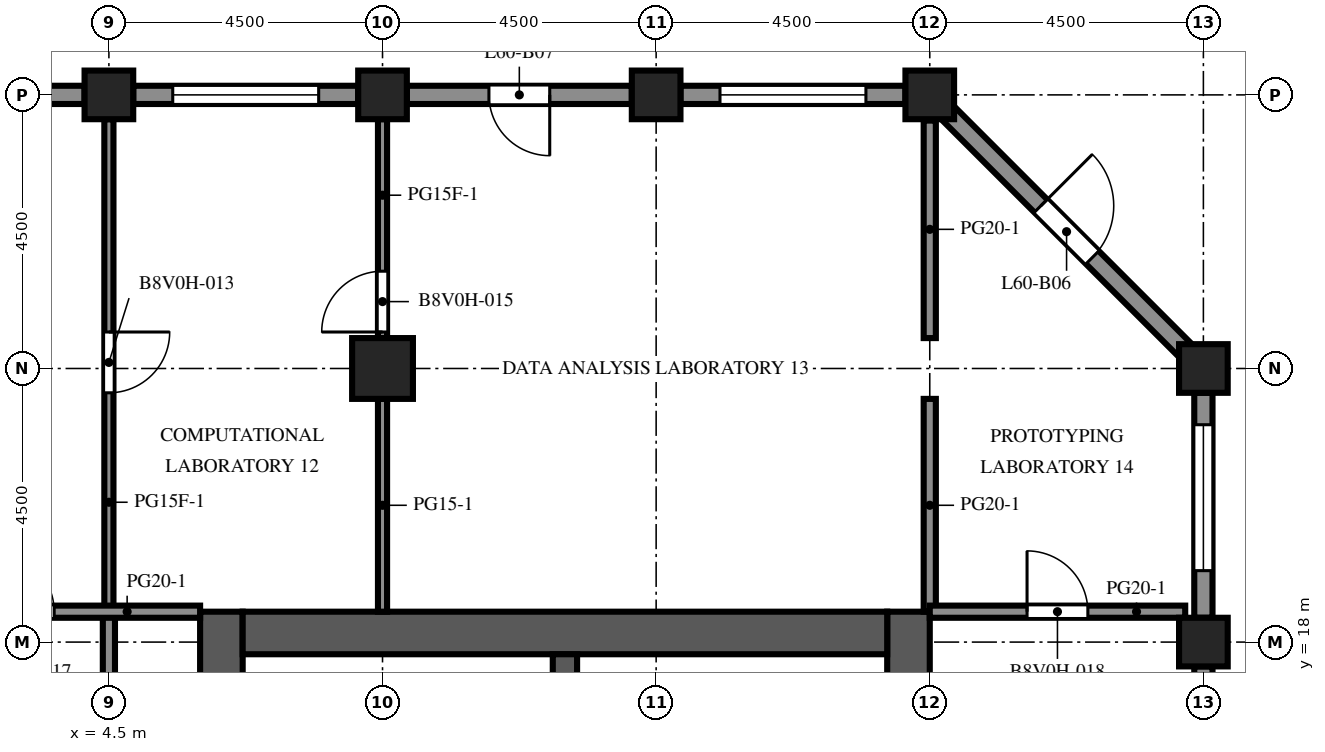
"""IFC4 building model, lengths in metres.
Left out: names, types, materials, properties, quantities, classifications, styles, units other than length and angle.
Written with IfcOpenShell. Run it as: python <this file> out.ifc"""

import sys

from ifc_helpers import new_model, si_unit, direction, frame, frame_2d, origin, origin_2d, place, context, subcontext, project, spatial, rectangle, extrude, element, fill, save


model = new_model("IFC4")
c1 = context("Model", 3, precision=1e-05, world=origin(), true_north=direction((0.0, 1.0)))
c2 = subcontext(c1, "Body", "Model", "MODEL_VIEW")
j1 = project(units=[si_unit("LENGTHUNIT", "METRE"), si_unit("PLANEANGLEUNIT", "RADIAN")], contexts=[c1])
p1 = place(None, origin())
s1 = spatial("IfcSite", under=j1, at=p1, CompositionType="ELEMENT")
p2 = place(p1, origin())
s2 = spatial("IfcBuilding", under=s1, at=p2, CompositionType="ELEMENT")
p3 = place(p2, frame((0.0, 0.0, 266.3)))
s3 = spatial("IfcBuildingStorey", under=s2, at=p3, CompositionType="ELEMENT", Elevation=266.3)
for number, where, z_axis, x_axis in (
    (1, (4.5, 27.0, -0.45), (0.0, 0.0, 1.0), (1.0, 0.0, 0.0)),
    (2, (9.0, 27.0, -0.45), (0.0, 0.0, 1.0), (1.0, 0.0, 0.0)),
    (3, (13.5, 27.0, -0.45), (0.0, 0.0, 1.0), (1.0, 0.0, 0.0)),
    (4, (18.0, 27.0, -0.45), (0.0, 0.0, 1.0), (1.0, 0.0, 0.0)),
    (5, (22.5, 18.0, -0.45), (0.0, 0.0, 1.0), (1.0, 0.0, 0.0)),
    (6, (22.5, 22.5, -0.45), (0.0, 0.0, 1.0), (1.0, 0.0, 0.0)),
):
    element("IfcColumn", number, at=place(p3, frame(where, z_axis=z_axis, x_axis=x_axis)), inside=s3, PredefinedType="COLUMN", context=c2, shape_type="SweptSolid", body=[
        extrude(rectangle(XDim=0.8, YDim=0.8, at=origin_2d()), origin(), (0.0, 0.0, 1.0), 4.55),
    ])
p4 = place(p3, frame((9.0, 22.5, 0.0), z_axis=(0.0, 0.0, 1.0), x_axis=(1.0, 0.0, 0.0)))
e7 = element("IfcColumn", 7, at=p4, inside=s3, PredefinedType="COLUMN", context=c2, shape_type="SweptSolid", body=[
    extrude(rectangle(XDim=1.0, YDim=1.0, at=origin_2d()), origin(), (0.0, 0.0, 1.0), 4.1),
])
p5 = place(p3, frame((6.35, -9.0, 0.0), z_axis=(0.0, 0.0, 1.0), x_axis=(0.0, 1.0, 0.0)))
e8 = element("IfcWall", 8, at=p5, inside=s3, PredefinedType="SHEAR", context=c2, shape_type="SweptSolid", body=[
    extrude(rectangle(XDim=27.5, YDim=0.7, at=frame_2d((13.75, 0.0))), origin(), (0.0, 0.0, 1.0), 4.1),
])
p6 = place(p5, frame((12.55, 0.0, 0.0)))
e9 = element("IfcOpeningElement", 9, at=p6, cuts=e8, PredefinedType="OPENING", context=c2, shape_type="SweptSolid", body=[
    extrude(rectangle(XDim=2.4, YDim=2.4, at=frame_2d((1.2, 1.2))), frame((0.0, 0.36, 0.0), z_axis=(0.0, -1.0, 0.0), x_axis=(1.0, 0.0, 0.0)), (0.0, 0.0, 1.0), 0.72),
])
p7 = place(p5, frame((3.788, 0.0, 0.0)))
e10 = element("IfcOpeningElement", 10, at=p7, cuts=e8, PredefinedType="OPENING", context=c2, shape_type="SweptSolid", body=[
    extrude(rectangle(XDim=0.968, YDim=2.1, at=frame_2d((0.484, 1.05))), frame((0.0, 0.36, 0.0), z_axis=(0.0, -1.0, 0.0), x_axis=(1.0, 0.0, 0.0)), (0.0, 0.0, 1.0), 0.72),
])
p8 = place(p5, frame((23.54, 0.0, 0.0)))
e11 = element("IfcOpeningElement", 11, at=p8, cuts=e8, PredefinedType="OPENING", context=c2, shape_type="SweptSolid", body=[
    extrude(rectangle(XDim=1.2, YDim=2.1, at=frame_2d((0.6, 1.05))), frame((0.0, 0.36, 0.0), z_axis=(0.0, -1.0, 0.0), x_axis=(1.0, 0.0, 0.0)), (0.0, 0.0, 1.0), 0.72),
])
p9 = place(p3, frame((17.65, -9.0, 0.0), z_axis=(0.0, 0.0, 1.0), x_axis=(0.0, 1.0, 0.0)))
e12 = element("IfcWall", 12, at=p9, inside=s3, PredefinedType="SHEAR", context=c2, shape_type="SweptSolid", body=[
    extrude(rectangle(XDim=27.5, YDim=0.7, at=frame_2d((13.75, 0.0))), origin(), (0.0, 0.0, 1.0), 4.1),
])
p10 = place(p9, frame((12.55, 0.0, 0.0)))
e13 = element("IfcOpeningElement", 13, at=p10, cuts=e12, PredefinedType="OPENING", context=c2, shape_type="SweptSolid", body=[
    extrude(rectangle(XDim=2.4, YDim=2.4, at=frame_2d((1.2, 1.2))), frame((0.0, 0.36, 0.0), z_axis=(0.0, -1.0, 0.0), x_axis=(1.0, 0.0, 0.0)), (0.0, 0.0, 1.0), 0.72),
])
p11 = place(p9, frame((6.825, 0.0, 0.0)))
e14 = element("IfcOpeningElement", 14, at=p11, cuts=e12, PredefinedType="OPENING", context=c2, shape_type="SweptSolid", body=[
    extrude(rectangle(XDim=1.2, YDim=2.1, at=frame_2d((0.6, 1.05))), frame((0.0, 0.36, 0.0), z_axis=(0.0, -1.0, 0.0), x_axis=(1.0, 0.0, 0.0)), (0.0, 0.0, 1.0), 0.72),
])
p12 = place(p9, frame((19.475, 0.0, 0.0)))
e15 = element("IfcOpeningElement", 15, at=p12, cuts=e12, PredefinedType="OPENING", context=c2, shape_type="SweptSolid", body=[
    extrude(rectangle(XDim=1.2, YDim=2.1, at=frame_2d((0.6, 1.05))), frame((0.0, 0.36, 0.0), z_axis=(0.0, -1.0, 0.0), x_axis=(1.0, 0.0, 0.0)), (0.0, 0.0, 1.0), 0.72),
])
p13 = place(p3, frame((6.7, 18.15, 0.0), z_axis=(0.0, 0.0, 1.0), x_axis=(1.0, 0.0, 0.0)))
e16 = element("IfcWall", 16, at=p13, inside=s3, PredefinedType="SHEAR", context=c2, shape_type="SweptSolid", body=[
    extrude(rectangle(XDim=10.6, YDim=0.7, at=frame_2d((5.3, 0.0))), origin(), (0.0, 0.0, 1.0), 4.1),
])
p14 = place(p3, frame((12.0, 10.2, 0.0), z_axis=(0.0, 0.0, 1.0), x_axis=(0.0, 1.0, 0.0)))
e17 = element("IfcWall", 17, at=p14, inside=s3, PredefinedType="SHEAR", context=c2, shape_type="SweptSolid", body=[
    extrude(rectangle(XDim=7.6, YDim=0.4, at=frame_2d((3.8, 0.0))), origin(), (0.0, 0.0, 1.0), 4.1),
])
p15 = place(p3, frame((22.5, 17.6, 0.0), z_axis=(0.0, 0.0, 1.0), x_axis=(0.0, -1.0, 0.0)))
e18 = element("IfcWall", 18, at=p15, inside=s3, PredefinedType="SOLIDWALL", context=c2, shape_type="SweptSolid", body=[
    extrude(rectangle(XDim=3.7, YDim=0.3, at=frame_2d((1.85, 0.0))), origin(), (0.0, 0.0, 1.0), 2.85),
])
p16 = place(p15, frame((1.35, 0.0, 0.0)))
e19 = element("IfcOpeningElement", 19, at=p16, cuts=e18, PredefinedType="OPENING", context=c2, shape_type="SweptSolid", body=[
    extrude(rectangle(XDim=1.0, YDim=2.2, at=frame_2d((0.5, 1.1))), frame((0.0, 0.16, 0.0), z_axis=(0.0, -1.0, 0.0), x_axis=(1.0, 0.0, 0.0)), (0.0, 0.0, 1.0), 0.32),
])
p17 = place(p3, frame((22.5, 22.1, 0.0), z_axis=(0.0, 0.0, 1.0), x_axis=(0.0, -1.0, 0.0)))
e20 = element("IfcWall", 20, at=p17, inside=s3, PredefinedType="SOLIDWALL", context=c2, shape_type="SweptSolid", body=[
    extrude(rectangle(XDim=3.7, YDim=0.3, at=frame_2d((1.85, 0.0))), origin(), (0.0, 0.0, 1.0), 2.85),
])
p18 = place(p17, frame((0.525, 0.0, 0.8)))
e21 = element("IfcOpeningElement", 21, at=p18, cuts=e20, PredefinedType="OPENING", context=c2, shape_type="SweptSolid", body=[
    extrude(rectangle(XDim=2.4, YDim=1.7, at=frame_2d((1.2, 0.85))), frame((0.0, 0.16, 0.0), z_axis=(0.0, -1.0, 0.0), x_axis=(1.0, 0.0, 0.0)), (0.0, 0.0, 1.0), 0.32),
])
p19 = place(p3, frame((18.294, 26.706, 0.0), z_axis=(0.0, 0.0, 1.0), x_axis=(0.707106781187, -0.707106781187, 0.0)))
e22 = element("IfcWall", 22, at=p19, inside=s3, PredefinedType="SOLIDWALL", context=c2, shape_type="SweptSolid", body=[
    extrude(rectangle(XDim=5.532, YDim=0.3, at=frame_2d((2.766, 0.0))), origin(), (0.0, 0.0, 1.0), 2.85),
])
p20 = place(p19, frame((2.166, 0.0, 0.0)))
e23 = element("IfcOpeningElement", 23, at=p20, cuts=e22, PredefinedType="OPENING", context=c2, shape_type="SweptSolid", body=[
    extrude(rectangle(XDim=1.2, YDim=2.2, at=frame_2d((0.6, 1.1))), frame((0.0, 0.16, 0.0), z_axis=(0.0, -1.0, 0.0), x_axis=(1.0, 0.0, 0.0)), (0.0, 0.0, 1.0), 0.32),
])
p21 = place(p3, frame((13.9, 27.0, 0.0), z_axis=(0.0, 0.0, 1.0), x_axis=(1.0, 0.0, 0.0)))
e24 = element("IfcWall", 24, at=p21, inside=s3, PredefinedType="SOLIDWALL", context=c2, shape_type="SweptSolid", body=[
    extrude(rectangle(XDim=3.7, YDim=0.3, at=frame_2d((1.85, 0.0))), origin(), (0.0, 0.0, 1.0), 2.85),
])
p22 = place(p21, frame((0.65, 0.0, 0.8)))
e25 = element("IfcOpeningElement", 25, at=p22, cuts=e24, PredefinedType="OPENING", context=c2, shape_type="SweptSolid", body=[
    extrude(rectangle(XDim=2.4, YDim=1.7, at=frame_2d((1.2, 0.85))), frame((0.0, 0.16, 0.0), z_axis=(0.0, -1.0, 0.0), x_axis=(1.0, 0.0, 0.0)), (0.0, 0.0, 1.0), 0.32),
])
p23 = place(p3, frame((9.4, 27.0, 0.0), z_axis=(0.0, 0.0, 1.0), x_axis=(1.0, 0.0, 0.0)))
e26 = element("IfcWall", 26, at=p23, inside=s3, PredefinedType="SOLIDWALL", context=c2, shape_type="SweptSolid", body=[
    extrude(rectangle(XDim=3.7, YDim=0.3, at=frame_2d((1.85, 0.0))), origin(), (0.0, 0.0, 1.0), 2.85),
])
p24 = place(p23, frame((1.35, 0.0, 0.0)))
e27 = element("IfcOpeningElement", 27, at=p24, cuts=e26, PredefinedType="OPENING", context=c2, shape_type="SweptSolid", body=[
    extrude(rectangle(XDim=1.0, YDim=2.2, at=frame_2d((0.5, 1.1))), frame((0.0, 0.16, 0.0), z_axis=(0.0, -1.0, 0.0), x_axis=(1.0, 0.0, 0.0)), (0.0, 0.0, 1.0), 0.32),
])
p25 = place(p3, frame((4.9, 27.0, 0.0), z_axis=(0.0, 0.0, 1.0), x_axis=(1.0, 0.0, 0.0)))
e28 = element("IfcWall", 28, at=p25, inside=s3, PredefinedType="SOLIDWALL", context=c2, shape_type="SweptSolid", body=[
    extrude(rectangle(XDim=3.7, YDim=0.3, at=frame_2d((1.85, 0.0))), origin(), (0.0, 0.0, 1.0), 2.85),
])
p26 = place(p25, frame((0.65, 0.0, 0.8)))
e29 = element("IfcOpeningElement", 29, at=p26, cuts=e28, PredefinedType="OPENING", context=c2, shape_type="SweptSolid", body=[
    extrude(rectangle(XDim=2.4, YDim=1.7, at=frame_2d((1.2, 0.85))), frame((0.0, 0.16, 0.0), z_axis=(0.0, -1.0, 0.0), x_axis=(1.0, 0.0, 0.0)), (0.0, 0.0, 1.0), 0.32),
])
p27 = place(p3, frame((0.4, 27.0, 0.0), z_axis=(0.0, 0.0, 1.0), x_axis=(1.0, 0.0, 0.0)))
e30 = element("IfcWall", 30, at=p27, inside=s3, PredefinedType="SOLIDWALL", context=c2, shape_type="SweptSolid", body=[
    extrude(rectangle(XDim=3.7, YDim=0.3, at=frame_2d((1.85, 0.0))), origin(), (0.0, 0.0, 1.0), 2.85),
])
p28 = place(p27, frame((0.65, 0.0, 0.8)))
e31 = element("IfcOpeningElement", 31, at=p28, cuts=e30, PredefinedType="OPENING", context=c2, shape_type="SweptSolid", body=[
    extrude(rectangle(XDim=2.4, YDim=1.7, at=frame_2d((1.2, 0.85))), frame((0.0, 0.16, 0.0), z_axis=(0.0, -1.0, 0.0), x_axis=(1.0, 0.0, 0.0)), (0.0, 0.0, 1.0), 0.32),
])
p29 = place(p3, frame((8.0, 15.14, 0.0), z_axis=(0.0, 0.0, 1.0), x_axis=(0.0, 1.0, 0.0)))
e32 = element("IfcWall", 32, at=p29, inside=s3, PredefinedType="PARTITIONING", context=c2, shape_type="SweptSolid", body=[
    extrude(rectangle(XDim=2.66, YDim=0.1, at=frame_2d((1.33, 0.0))), origin(), (0.0, 0.0, 1.0), 3.65),
])
p30 = place(p29, frame((0.83, 0.0, 0.0)))
e33 = element("IfcOpeningElement", 33, at=p30, cuts=e32, PredefinedType="OPENING", context=c2, shape_type="SweptSolid", body=[
    extrude(rectangle(XDim=1.0, YDim=2.1, at=frame_2d((0.5, 1.05))), frame((0.0, 0.06, 0.0), z_axis=(0.0, -1.0, 0.0), x_axis=(1.0, 0.0, 0.0)), (0.0, 0.0, 1.0), 0.12),
])
p31 = place(p3, frame((4.5, 26.6, 0.0), z_axis=(0.0, 0.0, 1.0), x_axis=(0.0, -1.0, 0.0)))
e34 = element("IfcWall", 34, at=p31, inside=s3, PredefinedType="PARTITIONING", context=c2, shape_type="SweptSolid", body=[
    extrude(rectangle(XDim=8.1, YDim=0.15, at=frame_2d((4.05, 0.0))), origin(), (0.0, 0.0, 1.0), 3.65),
])
p32 = place(p31, frame((3.5, 0.0, 0.0)))
e35 = element("IfcOpeningElement", 35, at=p32, cuts=e34, PredefinedType="OPENING", context=c2, shape_type="SweptSolid", body=[
    extrude(rectangle(XDim=1.0, YDim=2.1, at=frame_2d((0.5, 1.05))), frame((0.0, 0.085, 0.0), z_axis=(0.0, -1.0, 0.0), x_axis=(1.0, 0.0, 0.0)), (0.0, 0.0, 1.0), 0.17),
])
p33 = place(p3, frame((4.5, 18.5, 0.0), z_axis=(0.0, 0.0, 1.0), x_axis=(0.0, -1.0, 0.0)))
e36 = element("IfcWall", 36, at=p33, inside=s3, PredefinedType="PARTITIONING", context=c2, shape_type="SweptSolid", body=[
    extrude(rectangle(XDim=11.8, YDim=0.2, at=frame_2d((5.9, 0.0))), origin(), (0.0, 0.0, 1.0), 3.65),
])
p34 = place(p33, frame((4.95, 0.0, 0.0)))
e37 = element("IfcOpeningElement", 37, at=p34, cuts=e36, PredefinedType="OPENING", context=c2, shape_type="SweptSolid", body=[
    extrude(rectangle(XDim=1.0, YDim=2.1, at=frame_2d((0.5, 1.05))), frame((0.0, 0.11, 0.0), z_axis=(0.0, -1.0, 0.0), x_axis=(1.0, 0.0, 0.0)), (0.0, 0.0, 1.0), 0.22),
])
p35 = place(p3, frame((9.0, 18.5, 0.0), z_axis=(0.0, 0.0, 1.0), x_axis=(0.0, 1.0, 0.0)))
e38 = element("IfcWall", 38, at=p35, inside=s3, PredefinedType="PARTITIONING", context=c2, shape_type="SweptSolid", body=[
    extrude(rectangle(XDim=3.5, YDim=0.15, at=frame_2d((1.75, 0.0))), origin(), (0.0, 0.0, 1.0), 3.65),
])
p36 = place(p3, frame((9.0, 26.6, 0.0), z_axis=(0.0, 0.0, 1.0), x_axis=(0.0, -1.0, 0.0)))
e39 = element("IfcWall", 39, at=p36, inside=s3, PredefinedType="PARTITIONING", context=c2, shape_type="SweptSolid", body=[
    extrude(rectangle(XDim=3.6, YDim=0.15, at=frame_2d((1.8, 0.0))), origin(), (0.0, 0.0, 1.0), 3.65),
])
p37 = place(p36, frame((2.5, 0.0, 0.0)))
e40 = element("IfcOpeningElement", 40, at=p37, cuts=e39, PredefinedType="OPENING", context=c2, shape_type="SweptSolid", body=[
    extrude(rectangle(XDim=1.0, YDim=2.1, at=frame_2d((0.5, 1.05))), frame((0.0, 0.085, 0.0), z_axis=(0.0, -1.0, 0.0), x_axis=(1.0, 0.0, 0.0)), (0.0, 0.0, 1.0), 0.17),
])
p38 = place(p3, frame((18.0, 18.5, 0.0), z_axis=(0.0, 0.0, 1.0), x_axis=(0.0, 1.0, 0.0)))
e41 = element("IfcWall", 41, at=p38, inside=s3, PredefinedType="PARTITIONING", context=c2, shape_type="SweptSolid", body=[
    extrude(rectangle(XDim=3.5, YDim=0.2, at=frame_2d((1.75, 0.0))), origin(), (0.0, 0.0, 1.0), 3.65),
])
p39 = place(p3, frame((18.0, 23.0, 0.0), z_axis=(0.0, 0.0, 1.0), x_axis=(0.0, 1.0, 0.0)))
e42 = element("IfcWall", 42, at=p39, inside=s3, PredefinedType="PARTITIONING", context=c2, shape_type="SweptSolid", body=[
    extrude(rectangle(XDim=3.577, YDim=0.2, at=frame_2d((1.789, 0.0))), origin(), (0.0, 0.0, 1.0), 3.65),
])
p40 = place(p3, frame((1.5, 18.5, 0.0), z_axis=(0.0, 0.0, 1.0), x_axis=(1.0, 0.0, 0.0)))
e43 = element("IfcWall", 43, at=p40, inside=s3, PredefinedType="PARTITIONING", context=c2, shape_type="SweptSolid", body=[
    extrude(rectangle(XDim=4.5, YDim=0.2, at=frame_2d((2.25, 0.0))), origin(), (0.0, 0.0, 1.0), 3.65),
])
p41 = place(p40, frame((1.1, 0.0, 0.0)))
e44 = element("IfcOpeningElement", 44, at=p41, cuts=e43, PredefinedType="OPENING", context=c2, shape_type="SweptSolid", body=[
    extrude(rectangle(XDim=1.0, YDim=2.1, at=frame_2d((0.5, 1.05))), frame((0.0, 0.11, 0.0), z_axis=(0.0, -1.0, 0.0), x_axis=(1.0, 0.0, 0.0)), (0.0, 0.0, 1.0), 0.22),
])
p42 = place(p3, frame((18.0, 18.5, 0.0), z_axis=(0.0, 0.0, 1.0), x_axis=(1.0, 0.0, 0.0)))
e45 = element("IfcWall", 45, at=p42, inside=s3, PredefinedType="PARTITIONING", context=c2, shape_type="SweptSolid", body=[
    extrude(rectangle(XDim=4.201, YDim=0.2, at=frame_2d((2.101, 0.0))), origin(), (0.0, 0.0, 1.0), 3.65),
])
p43 = place(p42, frame((1.6, 0.0, 0.0)))
e46 = element("IfcOpeningElement", 46, at=p43, cuts=e45, PredefinedType="OPENING", context=c2, shape_type="SweptSolid", body=[
    extrude(rectangle(XDim=1.0, YDim=2.1, at=frame_2d((0.5, 1.05))), frame((0.0, 0.11, 0.0), z_axis=(0.0, -1.0, 0.0), x_axis=(1.0, 0.0, 0.0)), (0.0, 0.0, 1.0), 0.22),
])
p44 = place(p18, origin())
e47 = element("IfcWindow", 47, at=p44, inside=s3, PartitioningType="SINGLE_PANEL", PredefinedType="WINDOW", context=c2, shape_type="SweptSolid", body=[
    extrude(rectangle(XDim=2.4, YDim=1.7, at=frame_2d((1.2, 0.85))), frame((0.0, 0.03, 0.0), z_axis=(0.0, -1.0, 0.0), x_axis=(1.0, 0.0, 0.0)), (0.0, 0.0, 1.0), 0.06),
])
fill(e21, e47)
p45 = place(p20, origin())
e48 = element("IfcDoor", 48, at=p45, inside=s3, OperationType="SINGLE_SWING_LEFT", PredefinedType="DOOR", context=c2, shape_type="SweptSolid", body=[
    extrude(rectangle(XDim=1.2, YDim=2.2, at=frame_2d((0.6, 1.1))), frame((0.0, 0.025, 0.0), z_axis=(0.0, -1.0, 0.0), x_axis=(1.0, 0.0, 0.0)), (0.0, 0.0, 1.0), 0.05),
])
fill(e23, e48)
p46 = place(p22, origin())
e49 = element("IfcWindow", 49, at=p46, inside=s3, PartitioningType="SINGLE_PANEL", PredefinedType="WINDOW", context=c2, shape_type="SweptSolid", body=[
    extrude(rectangle(XDim=2.4, YDim=1.7, at=frame_2d((1.2, 0.85))), frame((0.0, 0.03, 0.0), z_axis=(0.0, -1.0, 0.0), x_axis=(1.0, 0.0, 0.0)), (0.0, 0.0, 1.0), 0.06),
])
fill(e25, e49)
p47 = place(p24, origin())
e50 = element("IfcDoor", 50, at=p47, inside=s3, OperationType="SINGLE_SWING_RIGHT", PredefinedType="DOOR", context=c2, shape_type="SweptSolid", body=[
    extrude(rectangle(XDim=1.0, YDim=2.2, at=frame_2d((0.5, 1.1))), frame((0.0, 0.025, 0.0), z_axis=(0.0, -1.0, 0.0), x_axis=(1.0, 0.0, 0.0)), (0.0, 0.0, 1.0), 0.05),
])
fill(e27, e50)
p48 = place(p26, origin())
e51 = element("IfcWindow", 51, at=p48, inside=s3, PartitioningType="SINGLE_PANEL", PredefinedType="WINDOW", context=c2, shape_type="SweptSolid", body=[
    extrude(rectangle(XDim=2.4, YDim=1.7, at=frame_2d((1.2, 0.85))), frame((0.0, 0.03, 0.0), z_axis=(0.0, -1.0, 0.0), x_axis=(1.0, 0.0, 0.0)), (0.0, 0.0, 1.0), 0.06),
])
fill(e29, e51)
p49 = place(p32, origin())
e52 = element("IfcDoor", 52, at=p49, inside=s3, OperationType="SINGLE_SWING_LEFT", PredefinedType="DOOR", context=c2, shape_type="SweptSolid", body=[
    extrude(rectangle(XDim=1.0, YDim=2.1, at=frame_2d((0.5, 1.05))), frame((0.0, 0.025, 0.0), z_axis=(0.0, -1.0, 0.0), x_axis=(1.0, 0.0, 0.0)), (0.0, 0.0, 1.0), 0.05),
])
fill(e35, e52)
p50 = place(p37, origin())
e53 = element("IfcDoor", 53, at=p50, inside=s3, OperationType="SINGLE_SWING_RIGHT", PredefinedType="DOOR", context=c2, shape_type="SweptSolid", body=[
    extrude(rectangle(XDim=1.0, YDim=2.1, at=frame_2d((0.5, 1.05))), frame((0.0, 0.025, 0.0), z_axis=(0.0, -1.0, 0.0), x_axis=(1.0, 0.0, 0.0)), (0.0, 0.0, 1.0), 0.05),
])
fill(e40, e53)
p51 = place(p41, origin())
e54 = element("IfcDoor", 54, at=p51, inside=s3, OperationType="SINGLE_SWING_LEFT", PredefinedType="DOOR", context=c2, shape_type="SweptSolid", body=[
    extrude(rectangle(XDim=1.0, YDim=2.1, at=frame_2d((0.5, 1.05))), frame((0.0, 0.025, 0.0), z_axis=(0.0, -1.0, 0.0), x_axis=(1.0, 0.0, 0.0)), (0.0, 0.0, 1.0), 0.05),
])
fill(e44, e54)
p52 = place(p43, origin())
e55 = element("IfcDoor", 55, at=p52, inside=s3, OperationType="SINGLE_SWING_LEFT", PredefinedType="DOOR", context=c2, shape_type="SweptSolid", body=[
    extrude(rectangle(XDim=1.0, YDim=2.1, at=frame_2d((0.5, 1.05))), frame((0.0, 0.025, 0.0), z_axis=(0.0, -1.0, 0.0), x_axis=(1.0, 0.0, 0.0)), (0.0, 0.0, 1.0), 0.05),
])
fill(e46, e55)
save(model, sys.argv[1])
